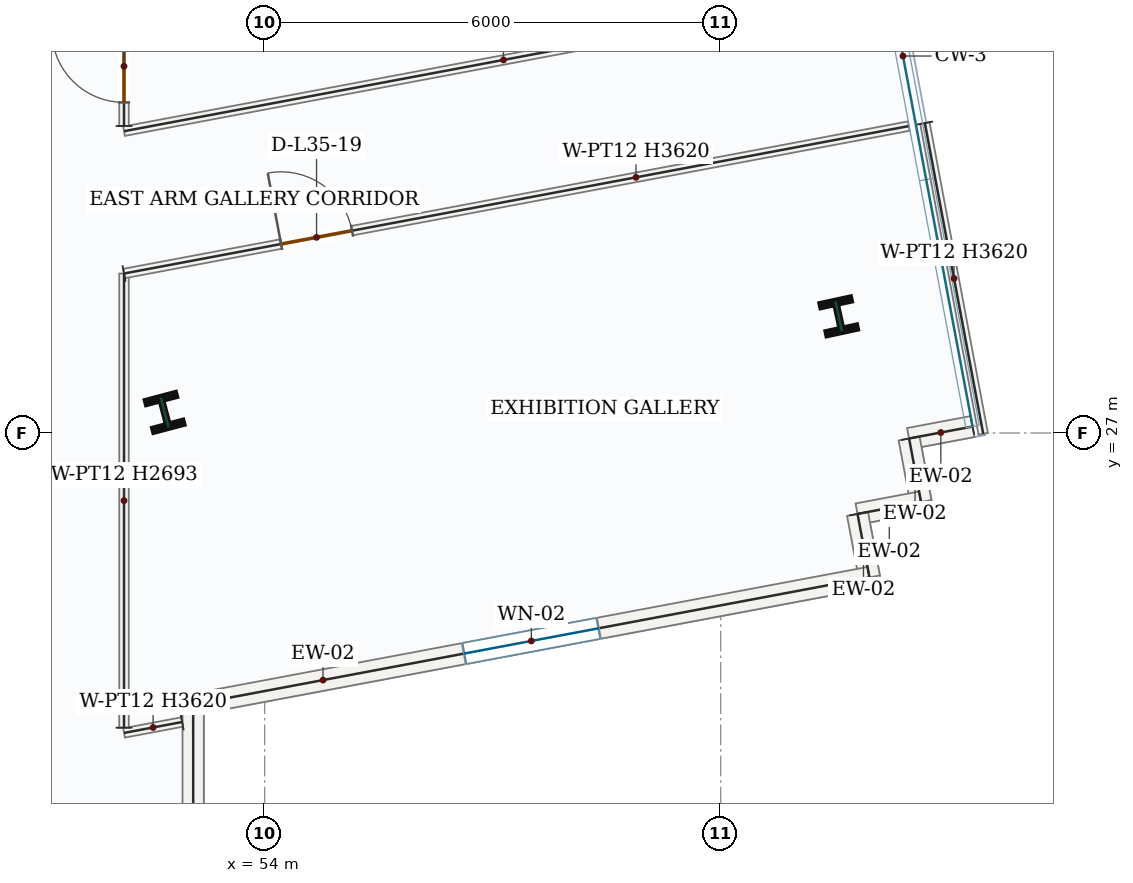
"""IFC4 building model, lengths in metres.
Left out: names, types, materials, properties, quantities, classifications, styles, units other than length and angle.
Written with IfcOpenShell. Run it as: python <this file> out.ifc"""

import sys

from ifc_helpers import new_model, si_unit, direction, frame, frame_2d, origin, origin_2d, place, context, subcontext, project, spatial, rectangle, i_section, extrude, source, transform, mapped, element, fill, save


model = new_model("IFC4")
c1 = context("Model", 3, precision=1e-05, world=origin(), true_north=direction((0.0, 1.0)))
c2 = subcontext(c1, "Body", "Model", "MODEL_VIEW")
j1 = project(units=[si_unit("LENGTHUNIT", "METRE"), si_unit("PLANEANGLEUNIT", "RADIAN")], contexts=[c1])
p1 = place(None, origin())
s1 = spatial("IfcSite", under=j1, at=p1, CompositionType="ELEMENT")
p2 = place(p1, origin())
s2 = spatial("IfcBuilding", under=s1, at=p2, CompositionType="ELEMENT")
p3 = place(p2, frame((0.0, 0.0, 155.1)))
s3 = spatial("IfcBuildingStorey", under=s2, at=p3, CompositionType="ELEMENT", Elevation=155.1)
m1 = source(origin(), c2, "Body", "SweptSolid", [
    extrude(i_section(OverallWidth=0.412, OverallDepth=0.435, WebThickness=0.036, FlangeThickness=0.057, FilletRadius=0.018, at=origin_2d()), origin(), (0.0, 0.0, 1.0), 3.9),
])
for number, where, z_axis, x_axis in (
    (1, (52.684, 27.271, 0.0), (0.0, 0.0, 1.0), (0.967, 0.255, 0.0)),
    (2, (61.553, 28.535, 0.0), (0.0, 0.0, 1.0), (0.977, 0.211, 0.0)),
):
    element("IfcColumn", number, at=place(p3, frame(where, z_axis=z_axis, x_axis=x_axis)), inside=s3, PredefinedType="COLUMN", context=c2, shape_type="MappedRepresentation", body=[
        mapped(m1, transform((0.0, 0.0, 0.0), x_axis=(1.0, 0.0, 0.0), y_axis=(0.0, 1.0, 0.0), z_axis=(0.0, 0.0, 1.0), scale=1.0)),
    ])
m2 = source(origin(), c2, "Body", "SweptSolid", [
    extrude(rectangle(XDim=0.85, YDim=0.28, at=frame_2d((0.425, 0.0))), origin(), (0.0, 0.0, 1.0), 3.62),
])
for number, where, z_axis, x_axis in (
    (3, (63.314, 27.085, 0.0), (0.0, 0.0, 1.0), (-0.983, -0.185, 0.0)),
    (4, (62.479, 26.928, 0.0), (0.0, 0.0, 1.0), (0.185, -0.983, 0.0)),
):
    element("IfcWall", number, at=place(p3, frame(where, z_axis=z_axis, x_axis=x_axis)), inside=s3, PredefinedType="SOLIDWALL", context=c2, shape_type="MappedRepresentation", body=[
        mapped(m2, transform((0.0, 0.0, 0.0), x_axis=(1.0, 0.0, 0.0), y_axis=(0.0, 1.0, 0.0), z_axis=(0.0, 0.0, 1.0), scale=1.0)),
    ])
m3 = source(origin(), c2, "Body", "SweptSolid", [
    extrude(rectangle(XDim=0.85, YDim=0.28, at=frame_2d((0.425, 0.0))), origin(), (0.0, 0.0, 1.0), 3.62),
])
p4 = place(p3, frame((62.635, 26.092, 0.0), z_axis=(0.0, 0.0, 1.0), x_axis=(-0.982790785128, -0.184722149909, 0.0)))
e5 = element("IfcWall", 5, at=p4, inside=s3, PredefinedType="SOLIDWALL", context=c2, shape_type="MappedRepresentation", body=[
    mapped(m3, transform((0.0, 0.0, 0.0), x_axis=(1.0, 0.0, 0.0), y_axis=(0.0, 1.0, 0.0), z_axis=(0.0, 0.0, 1.0), scale=1.0)),
])
p5 = place(p3, frame((61.8, 25.935, 0.0), z_axis=(0.0, 0.0, 1.0), x_axis=(0.184392582027, -0.982852672425, 0.0)))
e6 = element("IfcWall", 6, at=p5, inside=s3, PredefinedType="SOLIDWALL", context=c2, shape_type="MappedRepresentation", body=[
    mapped(m2, transform((0.0, 0.0, 0.0), x_axis=(1.0, 0.0, 0.0), y_axis=(0.0, 1.0, 0.0), z_axis=(0.0, 0.0, 1.0), scale=1.0)),
])
p6 = place(p3, frame((61.957, 25.1, 0.0), z_axis=(0.0, 0.0, 1.0), x_axis=(-0.982808012228, -0.184630471755, 0.0)))
e7 = element("IfcWall", 7, at=p6, inside=s3, PredefinedType="SOLIDWALL", context=c2, shape_type="SweptSolid", body=[
    extrude(rectangle(XDim=9.052, YDim=0.28, at=frame_2d((4.526, 0.0))), origin(), (0.0, 0.0, 1.0), 3.62),
])
p7 = place(p6, frame((3.626, 0.0, 0.85)))
e8 = element("IfcOpeningElement", 8, at=p7, cuts=e7, PredefinedType="OPENING", context=c2, shape_type="SweptSolid", body=[
    extrude(rectangle(XDim=1.8, YDim=1.75, at=frame_2d((0.9, 0.875))), frame((0.0, 0.15, 0.0), z_axis=(0.0, -1.0, 0.0), x_axis=(1.0, 0.0, 0.0)), (0.0, 0.0, 1.0), 0.3),
])
m4 = source(origin(), c2, "Body", "SweptSolid", [
    extrude(rectangle(XDim=4.97, YDim=0.28, at=frame_2d((2.485, 0.0))), origin(), (0.0, 0.0, 1.0), 3.62),
])
p8 = place(p3, frame((53.06, 23.428, 0.0), z_axis=(0.0, 0.0, 1.0), x_axis=(0.0, -1.0, 0.0)))
e9 = element("IfcWall", 9, at=p8, inside=s3, PredefinedType="SOLIDWALL", context=c2, shape_type="MappedRepresentation", body=[
    mapped(m4, transform((0.0, 0.0, 0.0), x_axis=(1.0, 0.0, 0.0), y_axis=(0.0, 1.0, 0.0), z_axis=(0.0, 0.0, 1.0), scale=1.0)),
])
m5 = source(origin(), c2, "Body", "SweptSolid", [
    extrude(rectangle(XDim=4.16, YDim=0.125, at=frame_2d((2.08, 0.0))), origin(), (0.0, 0.0, 1.0), 3.62),
])
p9 = place(p3, frame((62.686, 31.077, 0.0), z_axis=(0.0, 0.0, 1.0), x_axis=(0.184635785614, -0.982807013951, 0.0)))
e10 = element("IfcWall", 10, at=p9, inside=s3, PredefinedType="PARTITIONING", context=c2, shape_type="MappedRepresentation", body=[
    mapped(m5, transform((0.0, 0.0, 0.0), x_axis=(1.0, 0.0, 0.0), y_axis=(0.0, 1.0, 0.0), z_axis=(0.0, 0.0, 1.0), scale=1.0)),
])
m6 = source(origin(), c2, "Body", "SweptSolid", [
    extrude(rectangle(XDim=0.779, YDim=0.125, at=frame_2d((0.389, 0.0))), origin(), (0.0, 0.0, 1.0), 3.62),
])
p10 = place(p3, frame((52.915, 23.198, 0.0), z_axis=(0.0, 0.0, 1.0), x_axis=(-0.982850878619, -0.184402143149, 0.0)))
e11 = element("IfcWall", 11, at=p10, inside=s3, PredefinedType="PARTITIONING", context=c2, shape_type="MappedRepresentation", body=[
    mapped(m6, transform((0.0, 0.0, 0.0), x_axis=(1.0, 0.0, 0.0), y_axis=(0.0, 1.0, 0.0), z_axis=(0.0, 0.0, 1.0), scale=1.0)),
])
m7 = source(origin(), c2, "Body", "SweptSolid", [
    extrude(rectangle(XDim=5.975, YDim=0.125, at=frame_2d((2.988, 0.0))), origin(), (0.0, 0.0, 1.0), 2.693),
])
p11 = place(p3, frame((52.15, 23.123, 0.0), z_axis=(0.0, 0.0, 1.0), x_axis=(0.0, 1.0, 0.0)))
e12 = element("IfcWall", 12, at=p11, inside=s3, PredefinedType="PARTITIONING", context=c2, shape_type="MappedRepresentation", body=[
    mapped(m7, transform((0.0, 0.0, 0.0), x_axis=(1.0, 0.0, 0.0), y_axis=(0.0, 1.0, 0.0), z_axis=(0.0, 0.0, 1.0), scale=1.0)),
])
p12 = place(p3, frame((52.15, 29.098, 0.0), z_axis=(0.0, 0.0, 1.0), x_axis=(0.982805559331, 0.184643528314, 0.0)))
e13 = element("IfcWall", 13, at=p12, inside=s3, PredefinedType="PARTITIONING", context=c2, shape_type="SweptSolid", body=[
    extrude(rectangle(XDim=10.505, YDim=0.125, at=frame_2d((5.252, 0.0))), origin(), (0.0, 0.0, 1.0), 3.62),
])
p13 = place(p12, frame((2.102, 0.0, 0.0)))
e14 = element("IfcOpeningElement", 14, at=p13, cuts=e13, PredefinedType="OPENING", context=c2, shape_type="SweptSolid", body=[
    extrude(rectangle(XDim=0.95, YDim=2.15, at=frame_2d((0.475, 1.075))), frame((0.0, 0.073, 0.0), z_axis=(0.0, -1.0, 0.0), x_axis=(1.0, 0.0, 0.0)), (0.0, 0.0, 1.0), 0.145),
])
m8 = source(origin(), c2, "Body", "SweptSolid", [
    extrude(rectangle(XDim=10.16, YDim=0.125, at=frame_2d((5.08, 0.0))), origin(), (0.0, 0.0, 1.0), 3.62),
])
p14 = place(p3, frame((62.135, 32.846, 0.0), z_axis=(0.0, 0.0, 1.0), x_axis=(-0.982809288671, -0.184623676981, 0.0)))
e15 = element("IfcWall", 15, at=p14, inside=s3, PredefinedType="PARTITIONING", context=c2, shape_type="MappedRepresentation", body=[
    mapped(m8, transform((0.0, 0.0, 0.0), x_axis=(1.0, 0.0, 0.0), y_axis=(0.0, 1.0, 0.0), z_axis=(0.0, 0.0, 1.0), scale=1.0)),
])
p15 = place(p3, frame((52.15, 31.039, 0.0), z_axis=(0.0, 0.0, 1.0), x_axis=(-0.0004137788, 0.999999914394, 0.0)))
e16 = element("IfcWall", 16, at=p15, inside=s3, PredefinedType="PARTITIONING", context=c2, shape_type="SweptSolid", body=[
    extrude(rectangle(XDim=2.36, YDim=0.125, at=frame_2d((1.18, 0.0))), origin(), (0.0, 0.0, 1.0), 3.079),
])
p16 = place(p15, frame((0.31, 0.0, 0.0)))
e17 = element("IfcOpeningElement", 17, at=p16, cuts=e16, PredefinedType="OPENING", context=c2, shape_type="SweptSolid", body=[
    extrude(rectangle(XDim=0.95, YDim=2.15, at=frame_2d((0.475, 1.075))), frame((0.0, 0.073, 0.0), z_axis=(0.0, -1.0, 0.0), x_axis=(1.0, 0.0, 0.0)), (0.0, 0.0, 1.0), 0.145),
])
m9 = source(origin(), c2, "Body", "SweptSolid", [
    extrude(rectangle(XDim=1.8, YDim=1.75, at=frame_2d((0.9, 0.875))), frame((0.0, 0.03, 0.0), z_axis=(0.0, -1.0, 0.0), x_axis=(1.0, 0.0, 0.0)), (0.0, 0.0, 1.0), 0.06),
])
p17 = place(p7, origin())
e18 = element("IfcWindow", 18, at=p17, inside=s3, PartitioningType="DOUBLE_PANEL_VERTICAL", PredefinedType="WINDOW", context=c2, shape_type="MappedRepresentation", body=[
    mapped(m9, transform((0.0, 0.0, 0.0), x_axis=(1.0, 0.0, 0.0), y_axis=(0.0, 1.0, 0.0), z_axis=(0.0, 0.0, 1.0), scale=1.0)),
])
fill(e8, e18)
m10 = source(origin(), c2, "Body", "SweptSolid", [
    extrude(rectangle(XDim=0.95, YDim=2.15, at=frame_2d((0.475, 1.075))), frame((0.0, 0.025, 0.0), z_axis=(0.0, -1.0, 0.0), x_axis=(1.0, 0.0, 0.0)), (0.0, 0.0, 1.0), 0.05),
])
p18 = place(p13, origin())
e19 = element("IfcDoor", 19, at=p18, inside=s3, OperationType="SINGLE_SWING_LEFT", PredefinedType="DOOR", context=c2, shape_type="MappedRepresentation", body=[
    mapped(m10, transform((0.0, 0.0, 0.0), x_axis=(1.0, 0.0, 0.0), y_axis=(0.0, 1.0, 0.0), z_axis=(0.0, 0.0, 1.0), scale=1.0)),
])
fill(e14, e19)
p19 = place(p16, origin())
e20 = element("IfcDoor", 20, at=p19, inside=s3, OperationType="SINGLE_SWING_RIGHT", PredefinedType="DOOR", context=c2, shape_type="MappedRepresentation", body=[
    mapped(m10, transform((0.0, 0.0, 0.0), x_axis=(1.0, 0.0, 0.0), y_axis=(0.0, 1.0, 0.0), z_axis=(0.0, 0.0, 1.0), scale=1.0)),
])
fill(e17, e20)
save(model, sys.argv[1])
